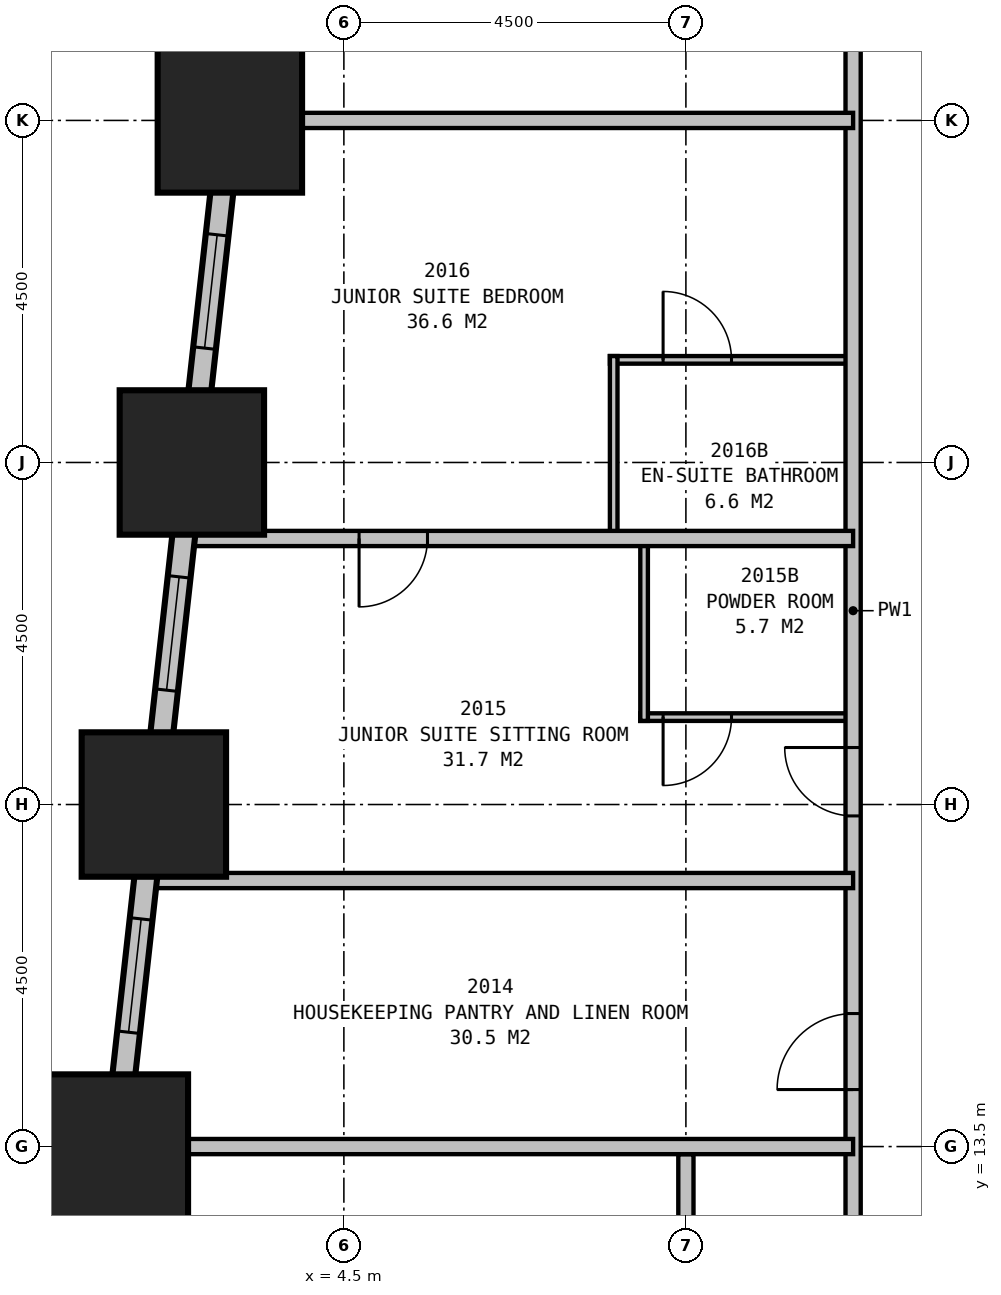
"""IFC4 building model, lengths in metres.
Left out: names, types, materials, properties, quantities, classifications, styles, units other than length and angle.
Written with IfcOpenShell. Run it as: python <this file> out.ifc"""

import sys

from ifc_helpers import new_model, si_unit, direction, frame, frame_2d, origin, origin_2d, place, context, subcontext, project, spatial, rectangle, extrude, element, fill, save


model = new_model("IFC4")
c1 = context("Model", 3, precision=1e-05, world=origin(), true_north=direction((0.0, 1.0)))
c2 = subcontext(c1, "Body", "Model", "MODEL_VIEW")
j1 = project(units=[si_unit("LENGTHUNIT", "METRE"), si_unit("PLANEANGLEUNIT", "RADIAN")], contexts=[c1])
p1 = place(None, origin())
s1 = spatial("IfcSite", under=j1, at=p1, CompositionType="ELEMENT")
p2 = place(p1, origin())
s2 = spatial("IfcBuilding", under=s1, at=p2, CompositionType="ELEMENT")
p3 = place(p2, frame((0.0, 0.0, 82.2)))
s3 = spatial("IfcBuildingStorey", under=s2, at=p3, CompositionType="ELEMENT", Elevation=82.2)
for number, where, z_axis, x_axis in (
    (1, (3.0, 27.0, 0.0), (0.0, 0.0, 1.0), (1.0, 0.0, 0.0)),
    (2, (2.5, 22.5, 0.0), (0.0, 0.0, 1.0), (1.0, 0.0, 0.0)),
    (3, (2.0, 18.0, 0.0), (0.0, 0.0, 1.0), (1.0, 0.0, 0.0)),
    (4, (1.5, 13.5, 0.0), (0.0, 0.0, 1.0), (1.0, 0.0, 0.0)),
):
    element("IfcColumn", number, at=place(p3, frame(where, z_axis=z_axis, x_axis=x_axis)), inside=s3, PredefinedType="COLUMN", context=c2, shape_type="SweptSolid", body=[
        extrude(rectangle(XDim=1.9, YDim=1.9, at=origin_2d()), origin(), (0.0, 0.0, 1.0), 3.5),
    ])
p4 = place(p3, frame((4.017, 36.149, 0.0), z_axis=(0.0, 0.0, 1.0), x_axis=(-0.110433201132, -0.993883548555, 0.0)))
e5 = element("IfcWall", 5, at=p4, inside=s3, PredefinedType="STANDARD", context=c2, shape_type="SweptSolid", body=[
    extrude(rectangle(XDim=31.994, YDim=0.3, at=frame_2d((15.997, 0.0))), origin(), (0.0, 0.0, 1.0), 2.1),
])
p5 = place(p4, frame((1.664, 0.0, 0.5)))
e6 = element("IfcOpeningElement", 6, at=p5, cuts=e5, PredefinedType="OPENING", context=c2, shape_type="SweptSolid", body=[
    extrude(rectangle(XDim=1.5, YDim=1.4, at=frame_2d((0.75, 0.7))), frame((0.0, 0.16, 0.0), z_axis=(0.0, -1.0, 0.0), x_axis=(1.0, 0.0, 0.0)), (0.0, 0.0, 1.0), 0.32),
])
p6 = place(p4, frame((6.192, 0.0, 0.5)))
e7 = element("IfcOpeningElement", 7, at=p6, cuts=e5, PredefinedType="OPENING", context=c2, shape_type="SweptSolid", body=[
    extrude(rectangle(XDim=1.5, YDim=1.4, at=frame_2d((0.75, 0.7))), frame((0.0, 0.16, 0.0), z_axis=(0.0, -1.0, 0.0), x_axis=(1.0, 0.0, 0.0)), (0.0, 0.0, 1.0), 0.32),
])
p7 = place(p4, frame((10.719, 0.0, 0.5)))
e8 = element("IfcOpeningElement", 8, at=p7, cuts=e5, PredefinedType="OPENING", context=c2, shape_type="SweptSolid", body=[
    extrude(rectangle(XDim=1.5, YDim=1.4, at=frame_2d((0.75, 0.7))), frame((0.0, 0.16, 0.0), z_axis=(0.0, -1.0, 0.0), x_axis=(1.0, 0.0, 0.0)), (0.0, 0.0, 1.0), 0.32),
])
p8 = place(p4, frame((15.247, 0.0, 0.5)))
e9 = element("IfcOpeningElement", 9, at=p8, cuts=e5, PredefinedType="OPENING", context=c2, shape_type="SweptSolid", body=[
    extrude(rectangle(XDim=1.5, YDim=1.4, at=frame_2d((0.75, 0.7))), frame((0.0, 0.16, 0.0), z_axis=(0.0, -1.0, 0.0), x_axis=(1.0, 0.0, 0.0)), (0.0, 0.0, 1.0), 0.32),
])
p9 = place(p4, frame((19.775, 0.0, 0.5)))
e10 = element("IfcOpeningElement", 10, at=p9, cuts=e5, PredefinedType="OPENING", context=c2, shape_type="SweptSolid", body=[
    extrude(rectangle(XDim=1.5, YDim=1.4, at=frame_2d((0.75, 0.7))), frame((0.0, 0.16, 0.0), z_axis=(0.0, -1.0, 0.0), x_axis=(1.0, 0.0, 0.0)), (0.0, 0.0, 1.0), 0.32),
])
p10 = place(p4, frame((24.302, 0.0, 0.5)))
e11 = element("IfcOpeningElement", 11, at=p10, cuts=e5, PredefinedType="OPENING", context=c2, shape_type="SweptSolid", body=[
    extrude(rectangle(XDim=1.5, YDim=1.4, at=frame_2d((0.75, 0.7))), frame((0.0, 0.16, 0.0), z_axis=(0.0, -1.0, 0.0), x_axis=(1.0, 0.0, 0.0)), (0.0, 0.0, 1.0), 0.32),
])
p11 = place(p4, frame((28.83, 0.0, 0.5)))
e12 = element("IfcOpeningElement", 12, at=p11, cuts=e5, PredefinedType="OPENING", context=c2, shape_type="SweptSolid", body=[
    extrude(rectangle(XDim=1.5, YDim=1.4, at=frame_2d((0.75, 0.7))), frame((0.0, 0.16, 0.0), z_axis=(0.0, -1.0, 0.0), x_axis=(1.0, 0.0, 0.0)), (0.0, 0.0, 1.0), 0.32),
])
p12 = place(p3, frame((11.2, 11.2, 0.0), z_axis=(0.0, 0.0, 1.0), x_axis=(0.0, 1.0, 0.0)))
e13 = element("IfcWall", 13, at=p12, inside=s3, PredefinedType="PARTITIONING", context=c2, shape_type="SweptSolid", body=[
    extrude(rectangle(XDim=18.7, YDim=0.2, at=frame_2d((9.35, 0.0))), origin(), (0.0, 0.0, 1.0), 3.25),
])
p13 = place(p12, frame((3.05, 0.0, 0.0)))
e14 = element("IfcOpeningElement", 14, at=p13, cuts=e13, PredefinedType="OPENING", context=c2, shape_type="SweptSolid", body=[
    extrude(rectangle(XDim=1.0, YDim=2.1, at=frame_2d((0.5, 1.05))), frame((0.0, 0.11, 0.0), z_axis=(0.0, -1.0, 0.0), x_axis=(1.0, 0.0, 0.0)), (0.0, 0.0, 1.0), 0.22),
])
p14 = place(p12, frame((6.65, 0.0, 0.0)))
e15 = element("IfcOpeningElement", 15, at=p14, cuts=e13, PredefinedType="OPENING", context=c2, shape_type="SweptSolid", body=[
    extrude(rectangle(XDim=0.9, YDim=2.1, at=frame_2d((0.45, 1.05))), frame((0.0, 0.11, 0.0), z_axis=(0.0, -1.0, 0.0), x_axis=(1.0, 0.0, 0.0)), (0.0, 0.0, 1.0), 0.22),
])
p15 = place(p3, frame((11.2, 17.0, 0.0), z_axis=(0.0, 0.0, 1.0), x_axis=(-1.0, 0.0, 0.0)))
e16 = element("IfcWall", 16, at=p15, inside=s3, PredefinedType="PARTITIONING", context=c2, shape_type="SweptSolid", body=[
    extrude(rectangle(XDim=9.31, YDim=0.2, at=frame_2d((4.655, 0.0))), origin(), (0.0, 0.0, 1.0), 3.25),
])
p16 = place(p3, frame((11.2, 21.5, 0.0), z_axis=(0.0, 0.0, 1.0), x_axis=(-1.0, 0.0, 0.0)))
e17 = element("IfcWall", 17, at=p16, inside=s3, PredefinedType="PARTITIONING", context=c2, shape_type="SweptSolid", body=[
    extrude(rectangle(XDim=8.81, YDim=0.2, at=frame_2d((4.405, 0.0))), origin(), (0.0, 0.0, 1.0), 3.25),
])
p17 = place(p16, frame((5.6, 0.0, 0.0)))
e18 = element("IfcOpeningElement", 18, at=p17, cuts=e17, PredefinedType="OPENING", context=c2, shape_type="SweptSolid", body=[
    extrude(rectangle(XDim=0.9, YDim=2.1, at=frame_2d((0.45, 1.05))), frame((0.0, 0.11, 0.0), z_axis=(0.0, -1.0, 0.0), x_axis=(1.0, 0.0, 0.0)), (0.0, 0.0, 1.0), 0.22),
])
p18 = place(p3, frame((8.45, 19.1, 0.0), z_axis=(0.0, 0.0, 1.0), x_axis=(0.0, 1.0, 0.0)))
e19 = element("IfcWall", 19, at=p18, inside=s3, PredefinedType="PLUMBINGWALL", context=c2, shape_type="SweptSolid", body=[
    extrude(rectangle(XDim=2.4, YDim=0.1, at=frame_2d((1.2, 0.0))), origin(), (0.0, 0.0, 1.0), 3.25),
])
p19 = place(p3, frame((11.2, 19.15, 0.0), z_axis=(0.0, 0.0, 1.0), x_axis=(-1.0, 0.0, 0.0)))
e20 = element("IfcWall", 20, at=p19, inside=s3, PredefinedType="PLUMBINGWALL", context=c2, shape_type="SweptSolid", body=[
    extrude(rectangle(XDim=2.8, YDim=0.1, at=frame_2d((1.4, 0.0))), origin(), (0.0, 0.0, 1.0), 3.25),
])
p20 = place(p19, frame((1.6, 0.0, 0.0)))
e21 = element("IfcOpeningElement", 21, at=p20, cuts=e20, PredefinedType="OPENING", context=c2, shape_type="SweptSolid", body=[
    extrude(rectangle(XDim=0.9, YDim=2.1, at=frame_2d((0.45, 1.05))), frame((0.0, 0.06, 0.0), z_axis=(0.0, -1.0, 0.0), x_axis=(1.0, 0.0, 0.0)), (0.0, 0.0, 1.0), 0.12),
])
p21 = place(p3, frame((8.05, 21.5, 0.0), z_axis=(0.0, 0.0, 1.0), x_axis=(0.0, 1.0, 0.0)))
e22 = element("IfcWall", 22, at=p21, inside=s3, PredefinedType="PLUMBINGWALL", context=c2, shape_type="SweptSolid", body=[
    extrude(rectangle(XDim=2.4, YDim=0.1, at=frame_2d((1.2, 0.0))), origin(), (0.0, 0.0, 1.0), 3.25),
])
p22 = place(p3, frame((11.2, 23.85, 0.0), z_axis=(0.0, 0.0, 1.0), x_axis=(-1.0, 0.0, 0.0)))
e23 = element("IfcWall", 23, at=p22, inside=s3, PredefinedType="PLUMBINGWALL", context=c2, shape_type="SweptSolid", body=[
    extrude(rectangle(XDim=3.2, YDim=0.1, at=frame_2d((1.6, 0.0))), origin(), (0.0, 0.0, 1.0), 3.25),
])
p23 = place(p22, frame((2.5, 0.0, 0.0), z_axis=(0.0, 0.0, 1.0), x_axis=(-1.0, 0.0, 0.0)))
e24 = element("IfcOpeningElement", 24, at=p23, cuts=e23, PredefinedType="OPENING", context=c2, shape_type="SweptSolid", body=[
    extrude(rectangle(XDim=0.9, YDim=2.1, at=frame_2d((0.45, 1.05))), frame((0.0, 0.06, 0.0), z_axis=(0.0, -1.0, 0.0), x_axis=(1.0, 0.0, 0.0)), (0.0, 0.0, 1.0), 0.12),
])
p24 = place(p3, frame((11.2, 13.5, 0.0), z_axis=(0.0, 0.0, 1.0), x_axis=(-1.0, 0.0, 0.0)))
e25 = element("IfcWall", 25, at=p24, inside=s3, PredefinedType="PARTITIONING", context=c2, shape_type="SweptSolid", body=[
    extrude(rectangle(XDim=9.921, YDim=0.2, at=frame_2d((4.96, 0.0))), origin(), (0.0, 0.0, 1.0), 1.9),
])
p25 = place(p3, frame((9.0, 4.6, 0.0), z_axis=(0.0, 0.0, 1.0), x_axis=(0.0, 1.0, 0.0)))
e26 = element("IfcWall", 26, at=p25, inside=s3, PredefinedType="PARTITIONING", context=c2, shape_type="SweptSolid", body=[
    extrude(rectangle(XDim=8.8, YDim=0.2, at=frame_2d((4.4, 0.0))), origin(), (0.0, 0.0, 1.0), 2.2),
])
p26 = place(p25, frame((4.05, 0.0, 0.0)))
e27 = element("IfcOpeningElement", 27, at=p26, cuts=e26, PredefinedType="OPENING", context=c2, shape_type="SweptSolid", body=[
    extrude(rectangle(XDim=0.9, YDim=2.1, at=frame_2d((0.45, 1.05))), frame((0.0, 0.11, 0.0), z_axis=(0.0, -1.0, 0.0), x_axis=(1.0, 0.0, 0.0)), (0.0, 0.0, 1.0), 0.22),
])
p27 = place(p3, frame((11.2, 27.0, 0.0), z_axis=(0.0, 0.0, 1.0), x_axis=(-1.0, 0.0, 0.0)))
e28 = element("IfcWall", 28, at=p27, inside=s3, PredefinedType="PARTITIONING", context=c2, shape_type="SweptSolid", body=[
    extrude(rectangle(XDim=7.977, YDim=0.2, at=frame_2d((3.988, 0.0))), origin(), (0.0, 0.0, 1.0), 1.9),
])
p28 = place(p7, origin())
e29 = element("IfcWindow", 29, at=p28, inside=s3, PartitioningType="SINGLE_PANEL", PredefinedType="WINDOW", context=c2, shape_type="SweptSolid", body=[
    extrude(rectangle(XDim=1.5, YDim=1.4, at=frame_2d((0.75, 0.7))), frame((0.0, 0.03, 0.0), z_axis=(0.0, -1.0, 0.0), x_axis=(1.0, 0.0, 0.0)), (0.0, 0.0, 1.0), 0.06),
])
fill(e8, e29)
p29 = place(p8, origin())
e30 = element("IfcWindow", 30, at=p29, inside=s3, PartitioningType="SINGLE_PANEL", PredefinedType="WINDOW", context=c2, shape_type="SweptSolid", body=[
    extrude(rectangle(XDim=1.5, YDim=1.4, at=frame_2d((0.75, 0.7))), frame((0.0, 0.03, 0.0), z_axis=(0.0, -1.0, 0.0), x_axis=(1.0, 0.0, 0.0)), (0.0, 0.0, 1.0), 0.06),
])
fill(e9, e30)
p30 = place(p9, origin())
e31 = element("IfcWindow", 31, at=p30, inside=s3, PartitioningType="SINGLE_PANEL", PredefinedType="WINDOW", context=c2, shape_type="SweptSolid", body=[
    extrude(rectangle(XDim=1.5, YDim=1.4, at=frame_2d((0.75, 0.7))), frame((0.0, 0.03, 0.0), z_axis=(0.0, -1.0, 0.0), x_axis=(1.0, 0.0, 0.0)), (0.0, 0.0, 1.0), 0.06),
])
fill(e10, e31)
p31 = place(p13, origin())
e32 = element("IfcDoor", 32, at=p31, inside=s3, OperationType="SINGLE_SWING_LEFT", PredefinedType="DOOR", context=c2, shape_type="SweptSolid", body=[
    extrude(rectangle(XDim=1.0, YDim=2.1, at=frame_2d((0.5, 1.05))), frame((0.0, 0.025, 0.0), z_axis=(0.0, -1.0, 0.0), x_axis=(1.0, 0.0, 0.0)), (0.0, 0.0, 1.0), 0.05),
])
fill(e14, e32)
p32 = place(p14, origin())
e33 = element("IfcDoor", 33, at=p32, inside=s3, OperationType="SINGLE_SWING_RIGHT", PredefinedType="DOOR", context=c2, shape_type="SweptSolid", body=[
    extrude(rectangle(XDim=0.9, YDim=2.1, at=frame_2d((0.45, 1.05))), frame((0.0, 0.025, 0.0), z_axis=(0.0, -1.0, 0.0), x_axis=(1.0, 0.0, 0.0)), (0.0, 0.0, 1.0), 0.05),
])
fill(e15, e33)
p33 = place(p17, origin())
e34 = element("IfcDoor", 34, at=p33, inside=s3, OperationType="SINGLE_SWING_RIGHT", PredefinedType="DOOR", context=c2, shape_type="SweptSolid", body=[
    extrude(rectangle(XDim=0.9, YDim=2.1, at=frame_2d((0.45, 1.05))), frame((0.0, 0.025, 0.0), z_axis=(0.0, -1.0, 0.0), x_axis=(1.0, 0.0, 0.0)), (0.0, 0.0, 1.0), 0.05),
])
fill(e18, e34)
p34 = place(p20, origin())
e35 = element("IfcDoor", 35, at=p34, inside=s3, OperationType="SINGLE_SWING_RIGHT", PredefinedType="DOOR", context=c2, shape_type="SweptSolid", body=[
    extrude(rectangle(XDim=0.9, YDim=2.1, at=frame_2d((0.45, 1.05))), frame((0.0, 0.025, 0.0), z_axis=(0.0, -1.0, 0.0), x_axis=(1.0, 0.0, 0.0)), (0.0, 0.0, 1.0), 0.05),
])
fill(e21, e35)
p35 = place(p23, origin())
e36 = element("IfcDoor", 36, at=p35, inside=s3, OperationType="SINGLE_SWING_LEFT", PredefinedType="DOOR", context=c2, shape_type="SweptSolid", body=[
    extrude(rectangle(XDim=0.9, YDim=2.1, at=frame_2d((0.45, 1.05))), frame((0.0, 0.025, 0.0), z_axis=(0.0, -1.0, 0.0), x_axis=(1.0, 0.0, 0.0)), (0.0, 0.0, 1.0), 0.05),
])
fill(e24, e36)
save(model, sys.argv[1])
